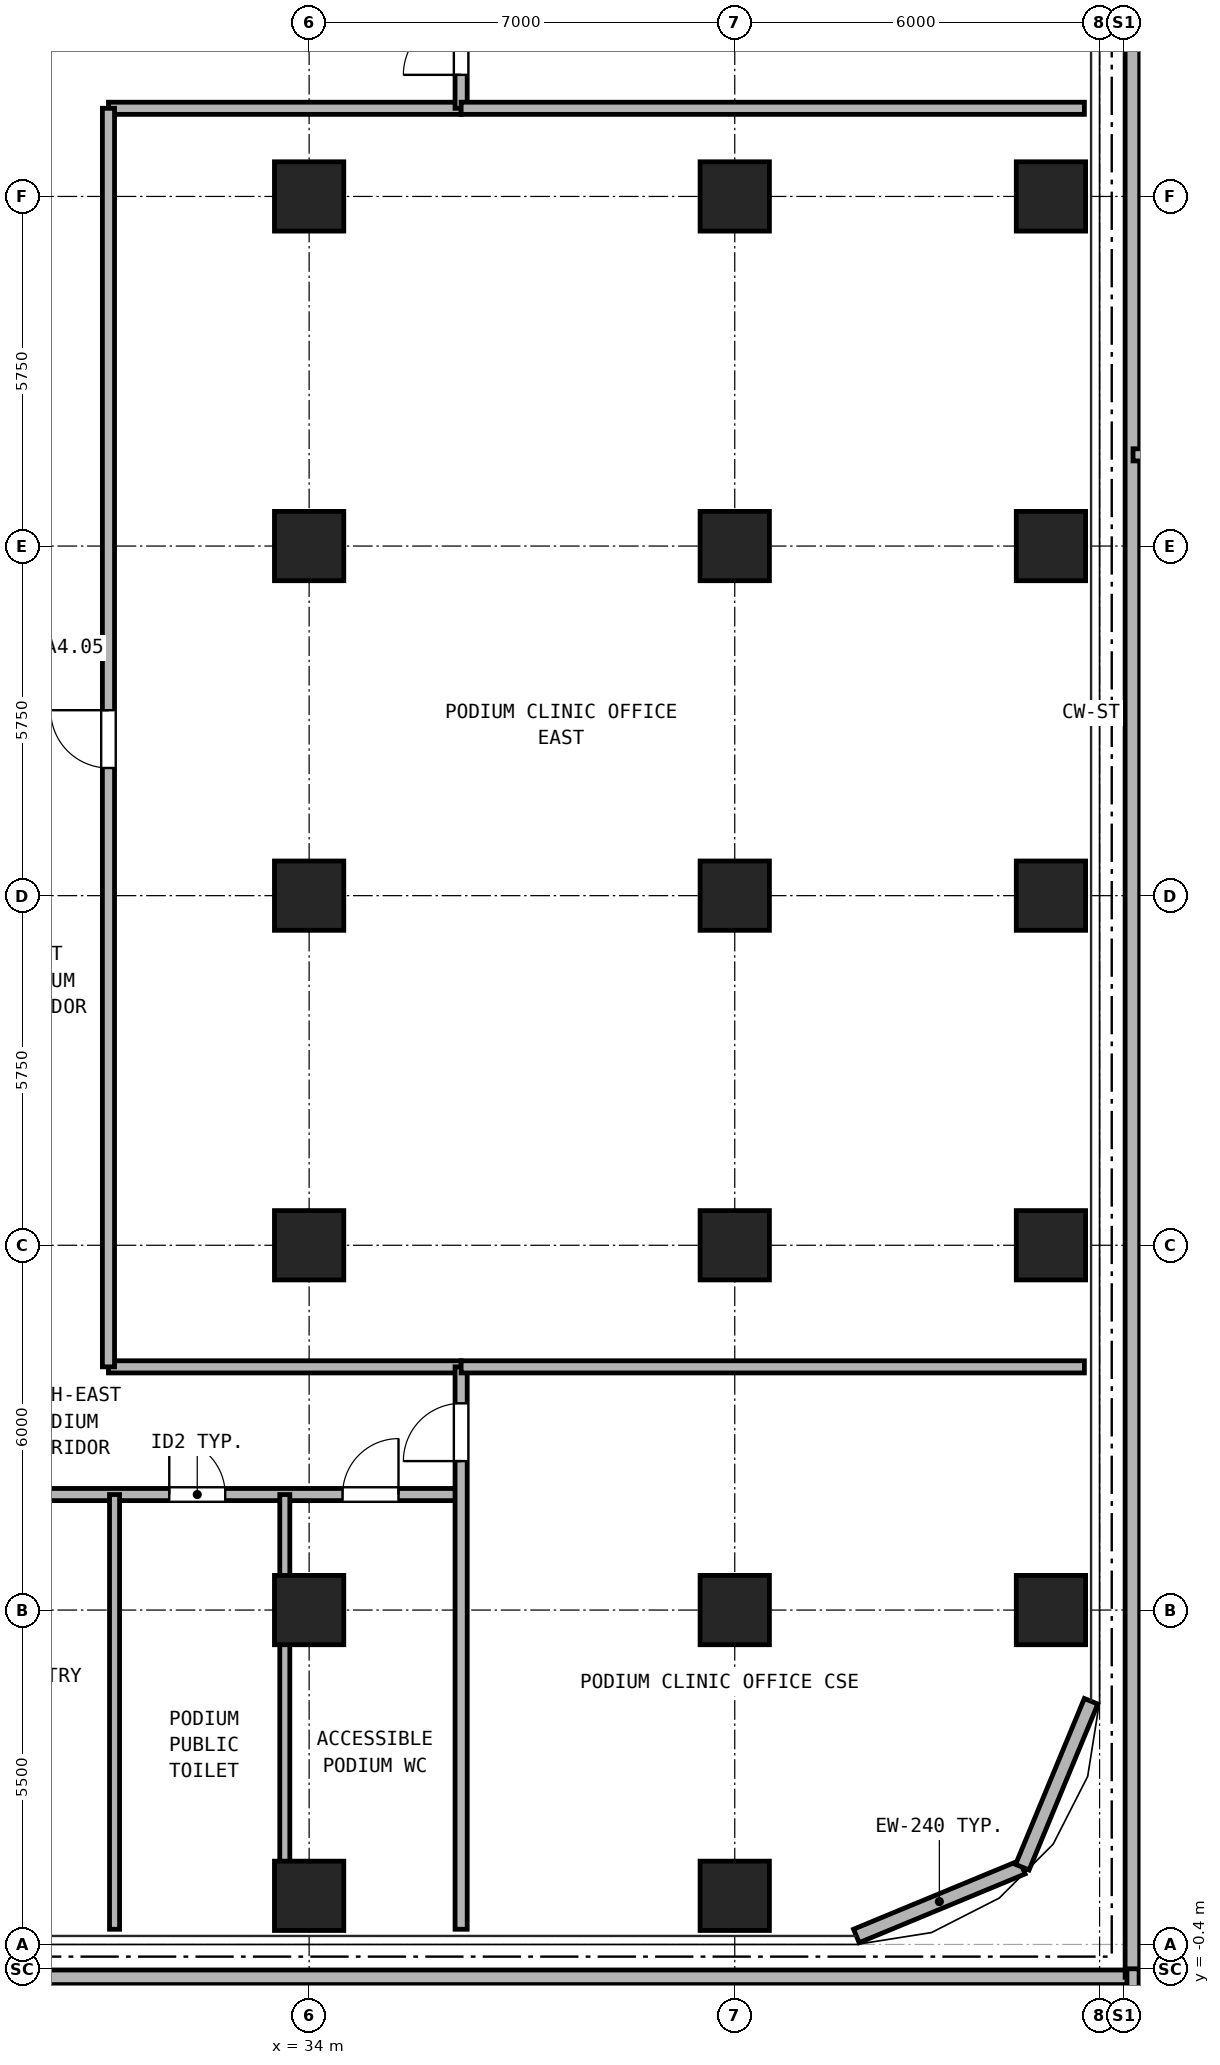
"""IFC4 building model, lengths in metres.
Left out: names, types, materials, properties, quantities, classifications, styles, units other than length and angle.
Written with IfcOpenShell. Run it as: python <this file> out.ifc"""

import sys

from ifc_helpers import new_model, si_unit, direction, frame, frame_2d, origin, origin_2d, place, context, subcontext, project, spatial, rectangle, hollow_rectangle, extrude, source, transform, mapped, element, fill, save


model = new_model("IFC4")
c1 = context("Model", 3, precision=1e-05, world=origin(), true_north=direction((0.0, 1.0)))
c2 = subcontext(c1, "Body", "Model", "MODEL_VIEW")
j1 = project(units=[si_unit("LENGTHUNIT", "METRE"), si_unit("PLANEANGLEUNIT", "RADIAN")], contexts=[c1])
p1 = place(None, origin())
s1 = spatial("IfcSite", under=j1, at=p1, CompositionType="ELEMENT")
p2 = place(p1, origin())
s2 = spatial("IfcBuilding", under=s1, at=p2, CompositionType="ELEMENT")
p3 = place(p2, frame((0.0, 0.0, 18.0)))
s3 = spatial("IfcBuildingStorey", under=s2, at=p3, CompositionType="ELEMENT", Elevation=18.0)
m1 = source(origin(), c2, "Body", "SweptSolid", [
    extrude(hollow_rectangle(XDim=1.14, YDim=1.14, WallThickness=0.07, at=origin_2d()), origin(), (0.0, 0.0, 1.0), 4.14),
])
for number, where, z_axis, x_axis in (
    (1, (34.0, 0.8, 0.0), (0.0, 0.0, 1.0), (1.0, 0.0, 0.0)),
    (2, (41.0, 0.8, 0.0), (0.0, 0.0, 1.0), (1.0, 0.0, 0.0)),
    (3, (46.2, 5.5, 0.0), (0.0, 0.0, 1.0), (1.0, 0.0, 0.0)),
    (4, (46.2, 11.5, 0.0), (0.0, 0.0, 1.0), (1.0, 0.0, 0.0)),
    (5, (46.2, 17.25, 0.0), (0.0, 0.0, 1.0), (1.0, 0.0, 0.0)),
    (6, (46.2, 23.0, 0.0), (0.0, 0.0, 1.0), (1.0, 0.0, 0.0)),
    (7, (46.2, 28.75, 0.0), (0.0, 0.0, 1.0), (1.0, 0.0, 0.0)),
    (8, (34.0, 5.5, 0.0), (0.0, 0.0, 1.0), (1.0, 0.0, 0.0)),
    (9, (34.0, 11.5, 0.0), (0.0, 0.0, 1.0), (1.0, 0.0, 0.0)),
    (10, (34.0, 17.25, 0.0), (0.0, 0.0, 1.0), (1.0, 0.0, 0.0)),
    (11, (34.0, 23.0, 0.0), (0.0, 0.0, 1.0), (1.0, 0.0, 0.0)),
    (12, (34.0, 28.75, 0.0), (0.0, 0.0, 1.0), (1.0, 0.0, 0.0)),
    (13, (41.0, 5.5, 0.0), (0.0, 0.0, 1.0), (1.0, 0.0, 0.0)),
    (14, (41.0, 11.5, 0.0), (0.0, 0.0, 1.0), (1.0, 0.0, 0.0)),
    (15, (41.0, 17.25, 0.0), (0.0, 0.0, 1.0), (1.0, 0.0, 0.0)),
    (16, (41.0, 23.0, 0.0), (0.0, 0.0, 1.0), (1.0, 0.0, 0.0)),
    (17, (41.0, 28.75, 0.0), (0.0, 0.0, 1.0), (1.0, 0.0, 0.0)),
):
    element("IfcColumn", number, at=place(p3, frame(where, z_axis=z_axis, x_axis=x_axis)), inside=s3, PredefinedType="COLUMN", context=c2, shape_type="MappedRepresentation", body=[
        mapped(m1, transform((0.0, 0.0, 0.0), x_axis=(1.0, 0.0, 0.0), y_axis=(0.0, 1.0, 0.0), z_axis=(0.0, 0.0, 1.0), scale=1.0)),
    ])
for number, where, z_axis, x_axis in (
    (18, (43.0, 0.14, 0.0), (0.0, 0.0, 1.0), (0.924, 0.383, 0.0)),
    (19, (45.729, 1.271, 0.0), (0.0, 0.0, 1.0), (0.383, 0.924, 0.0)),
):
    element("IfcWall", number, at=place(p3, frame(where, z_axis=z_axis, x_axis=x_axis)), inside=s3, PredefinedType="SOLIDWALL", context=c2, shape_type="SweptSolid", body=[
        extrude(rectangle(XDim=2.954, YDim=0.24, at=frame_2d((1.477, 0.0))), origin(), (0.0, 0.0, 1.0), 4.14),
    ])
p4 = place(p3, frame((0.2, -0.54, 0.0), z_axis=(0.0, 0.0, 1.0), x_axis=(1.0, 0.0, 0.0)))
e20 = element("IfcWall", 20, at=p4, inside=s3, PredefinedType="SOLIDWALL", context=c2, shape_type="SweptSolid", body=[
    extrude(rectangle(XDim=47.34, YDim=0.24, at=frame_2d((23.67, 0.0))), origin(), (0.0, 0.0, 1.0), 4.2),
])
p5 = place(p3, frame((47.54, -0.54, 0.0), z_axis=(0.0, 0.0, 1.0), x_axis=(0.0, 1.0, 0.0)))
e21 = element("IfcWall", 21, at=p5, inside=s3, PredefinedType="SOLIDWALL", context=c2, shape_type="SweptSolid", body=[
    extrude(rectangle(XDim=40.89, YDim=0.24, at=frame_2d((20.445, 0.0))), origin(), (0.0, 0.0, 1.0), 4.2),
])
p6 = place(p3, frame((10.5, 7.4, 0.0), z_axis=(0.0, 0.0, 1.0), x_axis=(1.0, 0.0, 0.0)))
e22 = element("IfcWall", 22, at=p6, inside=s3, PredefinedType="PARTITIONING", context=c2, shape_type="SweptSolid", body=[
    extrude(rectangle(XDim=26.0, YDim=0.2, at=frame_2d((13.0, 0.0))), origin(), (0.0, 0.0, 1.0), 4.14),
])
p7 = place(p6, frame((3.5, 0.0, 0.0)))
e23 = element("IfcOpeningElement", 23, at=p7, cuts=e22, PredefinedType="OPENING", context=c2, shape_type="SweptSolid", body=[
    extrude(rectangle(XDim=0.95, YDim=2.15, at=frame_2d((0.475, 1.075))), frame((0.0, 0.11, 0.0), z_axis=(0.0, -1.0, 0.0), x_axis=(1.0, 0.0, 0.0)), (0.0, 0.0, 1.0), 0.22),
])
p8 = place(p6, frame((11.0, 0.0, 0.0)))
e24 = element("IfcOpeningElement", 24, at=p8, cuts=e22, PredefinedType="OPENING", context=c2, shape_type="SweptSolid", body=[
    extrude(rectangle(XDim=0.95, YDim=2.15, at=frame_2d((0.475, 1.075))), frame((0.0, 0.11, 0.0), z_axis=(0.0, -1.0, 0.0), x_axis=(1.0, 0.0, 0.0)), (0.0, 0.0, 1.0), 0.22),
])
p9 = place(p6, frame((17.15, 0.0, 0.0)))
e25 = element("IfcOpeningElement", 25, at=p9, cuts=e22, PredefinedType="OPENING", context=c2, shape_type="SweptSolid", body=[
    extrude(rectangle(XDim=0.95, YDim=2.15, at=frame_2d((0.475, 1.075))), frame((0.0, 0.11, 0.0), z_axis=(0.0, -1.0, 0.0), x_axis=(1.0, 0.0, 0.0)), (0.0, 0.0, 1.0), 0.22),
])
p10 = place(p6, frame((21.2, 0.0, 0.0)))
e26 = element("IfcOpeningElement", 26, at=p10, cuts=e22, PredefinedType="OPENING", context=c2, shape_type="SweptSolid", body=[
    extrude(rectangle(XDim=0.92, YDim=2.1, at=frame_2d((0.46, 1.05))), frame((0.0, 0.11, 0.0), z_axis=(0.0, -1.0, 0.0), x_axis=(1.0, 0.0, 0.0)), (0.0, 0.0, 1.0), 0.22),
])
p11 = place(p6, frame((24.05, 0.0, 0.0)))
e27 = element("IfcOpeningElement", 27, at=p11, cuts=e22, PredefinedType="OPENING", context=c2, shape_type="SweptSolid", body=[
    extrude(rectangle(XDim=0.92, YDim=2.1, at=frame_2d((0.46, 1.05))), frame((0.0, 0.11, 0.0), z_axis=(0.0, -1.0, 0.0), x_axis=(1.0, 0.0, 0.0)), (0.0, 0.0, 1.0), 0.22),
])
for number, where, z_axis, x_axis in (
    (28, (30.7, 9.5, 0.0), (0.0, 0.0, 1.0), (1.0, 0.0, 0.0)),
    (29, (30.7, 30.2, 0.0), (0.0, 0.0, 1.0), (1.0, 0.0, 0.0)),
):
    element("IfcWall", number, at=place(p3, frame(where, z_axis=z_axis, x_axis=x_axis)), inside=s3, PredefinedType="PARTITIONING", context=c2, shape_type="SweptSolid", body=[
        extrude(rectangle(XDim=5.8, YDim=0.2, at=frame_2d((2.9, 0.0))), origin(), (0.0, 0.0, 1.0), 4.14),
    ])
p12 = place(p3, frame((30.7, 9.5, 0.0), z_axis=(0.0, 0.0, 1.0), x_axis=(0.0, 1.0, 0.0)))
e30 = element("IfcWall", 30, at=p12, inside=s3, PredefinedType="PARTITIONING", context=c2, shape_type="SweptSolid", body=[
    extrude(rectangle(XDim=20.7, YDim=0.2, at=frame_2d((10.35, 0.0))), origin(), (0.0, 0.0, 1.0), 4.14),
])
p13 = place(p12, frame((9.85, 0.0, 0.0)))
e31 = element("IfcOpeningElement", 31, at=p13, cuts=e30, PredefinedType="OPENING", context=c2, shape_type="SweptSolid", body=[
    extrude(rectangle(XDim=0.95, YDim=2.15, at=frame_2d((0.475, 1.075))), frame((0.0, 0.11, 0.0), z_axis=(0.0, -1.0, 0.0), x_axis=(1.0, 0.0, 0.0)), (0.0, 0.0, 1.0), 0.22),
])
p14 = place(p3, frame((36.5, 0.25, 0.0), z_axis=(0.0, 0.0, 1.0), x_axis=(0.0, 1.0, 0.0)))
e32 = element("IfcWall", 32, at=p14, inside=s3, PredefinedType="PARTITIONING", context=c2, shape_type="SweptSolid", body=[
    extrude(rectangle(XDim=9.25, YDim=0.2, at=frame_2d((4.625, 0.0))), origin(), (0.0, 0.0, 1.0), 4.14),
])
p15 = place(p14, frame((7.7, 0.0, 0.0)))
e33 = element("IfcOpeningElement", 33, at=p15, cuts=e32, PredefinedType="OPENING", context=c2, shape_type="SweptSolid", body=[
    extrude(rectangle(XDim=0.95, YDim=2.15, at=frame_2d((0.475, 1.075))), frame((0.0, 0.11, 0.0), z_axis=(0.0, -1.0, 0.0), x_axis=(1.0, 0.0, 0.0)), (0.0, 0.0, 1.0), 0.22),
])
p16 = place(p3, frame((36.5, 30.2, 0.0), z_axis=(0.0, 0.0, 1.0), x_axis=(0.0, 1.0, 0.0)))
e34 = element("IfcWall", 34, at=p16, inside=s3, PredefinedType="PARTITIONING", context=c2, shape_type="SweptSolid", body=[
    extrude(rectangle(XDim=10.05, YDim=0.2, at=frame_2d((5.025, 0.0))), origin(), (0.0, 0.0, 1.0), 4.14),
])
p17 = place(p16, frame((0.55, 0.0, 0.0)))
e35 = element("IfcOpeningElement", 35, at=p17, cuts=e34, PredefinedType="OPENING", context=c2, shape_type="SweptSolid", body=[
    extrude(rectangle(XDim=0.95, YDim=2.15, at=frame_2d((0.475, 1.075))), frame((0.0, 0.11, 0.0), z_axis=(0.0, -1.0, 0.0), x_axis=(1.0, 0.0, 0.0)), (0.0, 0.0, 1.0), 0.22),
])
for number, where, z_axis, x_axis in (
    (36, (36.5, 9.5, 0.0), (0.0, 0.0, 1.0), (1.0, 0.0, 0.0)),
    (37, (36.5, 30.2, 0.0), (0.0, 0.0, 1.0), (1.0, 0.0, 0.0)),
):
    element("IfcWall", number, at=place(p3, frame(where, z_axis=z_axis, x_axis=x_axis)), inside=s3, PredefinedType="PARTITIONING", context=c2, shape_type="SweptSolid", body=[
        extrude(rectangle(XDim=10.25, YDim=0.2, at=frame_2d((5.125, 0.0))), origin(), (0.0, 0.0, 1.0), 4.14),
    ])
for number, where, z_axis, x_axis in (
    (38, (30.8, 0.25, 0.0), (0.0, 0.0, 1.0), (0.0, 1.0, 0.0)),
    (39, (33.6, 0.25, 0.0), (0.0, 0.0, 1.0), (0.0, 1.0, 0.0)),
):
    element("IfcWall", number, at=place(p3, frame(where, z_axis=z_axis, x_axis=x_axis)), inside=s3, PredefinedType="PARTITIONING", context=c2, shape_type="SweptSolid", body=[
        extrude(rectangle(XDim=7.15, YDim=0.165, at=frame_2d((3.575, 0.0))), origin(), (0.0, 0.0, 1.0), 4.14),
    ])
p18 = place(p3, frame((47.55, 24.5, 0.0), z_axis=(0.0, 0.0, 1.0), x_axis=(1.0, 0.0, 0.0)))
e40 = element("IfcWall", 40, at=p18, inside=s3, PredefinedType="PARTITIONING", context=c2, shape_type="SweptSolid", body=[
    extrude(rectangle(XDim=23.9, YDim=0.2, at=frame_2d((11.95, 0.0))), origin(), (0.0, 0.0, 1.0), 4.14),
])
p19 = place(p18, frame((3.45, 0.0, 0.0)))
e41 = element("IfcOpeningElement", 41, at=p19, cuts=e40, PredefinedType="OPENING", context=c2, shape_type="SweptSolid", body=[
    extrude(rectangle(XDim=1.3, YDim=2.2, at=frame_2d((0.65, 1.1))), frame((0.0, 0.11, 0.0), z_axis=(0.0, -1.0, 0.0), x_axis=(1.0, 0.0, 0.0)), (0.0, 0.0, 1.0), 0.22),
])
p20 = place(p3, frame((47.55, -10.95, 0.0), z_axis=(0.0, 0.0, 1.0), x_axis=(0.0, 1.0, 0.0)))
e42 = element("IfcWall", 42, at=p20, inside=s3, PredefinedType="PARTITIONING", context=c2, shape_type="SweptSolid", body=[
    extrude(rectangle(XDim=10.55, YDim=0.2, at=frame_2d((5.275, 0.0))), origin(), (0.0, 0.0, 1.0), 4.14),
])
p21 = place(p20, frame((5.35, 0.0, 0.0)))
e43 = element("IfcOpeningElement", 43, at=p21, cuts=e42, PredefinedType="OPENING", context=c2, shape_type="SweptSolid", body=[
    extrude(rectangle(XDim=1.3, YDim=2.2, at=frame_2d((0.65, 1.1))), frame((0.0, 0.11, 0.0), z_axis=(0.0, -1.0, 0.0), x_axis=(1.0, 0.0, 0.0)), (0.0, 0.0, 1.0), 0.22),
])
p22 = place(p10, frame((0.92, 0.0, 0.0), z_axis=(0.0, 0.0, 1.0), x_axis=(-1.0, 0.0, 0.0)))
e44 = element("IfcDoor", 44, at=p22, inside=s3, OperationType="SINGLE_SWING_LEFT", PredefinedType="DOOR", context=c2, shape_type="SweptSolid", body=[
    extrude(rectangle(XDim=0.92, YDim=2.1, at=frame_2d((0.46, 1.05))), frame((0.0, 0.025, 0.0), z_axis=(0.0, -1.0, 0.0), x_axis=(1.0, 0.0, 0.0)), (0.0, 0.0, 1.0), 0.05),
])
fill(e26, e44)
p23 = place(p11, frame((0.92, 0.0, 0.0), z_axis=(0.0, 0.0, 1.0), x_axis=(-1.0, 0.0, 0.0)))
e45 = element("IfcDoor", 45, at=p23, inside=s3, OperationType="SINGLE_SWING_RIGHT", PredefinedType="DOOR", context=c2, shape_type="SweptSolid", body=[
    extrude(rectangle(XDim=0.92, YDim=2.1, at=frame_2d((0.46, 1.05))), frame((0.0, 0.025, 0.0), z_axis=(0.0, -1.0, 0.0), x_axis=(1.0, 0.0, 0.0)), (0.0, 0.0, 1.0), 0.05),
])
fill(e27, e45)
p24 = place(p15, origin())
e46 = element("IfcDoor", 46, at=p24, inside=s3, OperationType="SINGLE_SWING_LEFT", PredefinedType="DOOR", context=c2, shape_type="SweptSolid", body=[
    extrude(rectangle(XDim=0.95, YDim=2.15, at=frame_2d((0.475, 1.075))), frame((0.0, 0.025, 0.0), z_axis=(0.0, -1.0, 0.0), x_axis=(1.0, 0.0, 0.0)), (0.0, 0.0, 1.0), 0.05),
])
fill(e33, e46)
p25 = place(p17, origin())
e47 = element("IfcDoor", 47, at=p25, inside=s3, OperationType="SINGLE_SWING_LEFT", PredefinedType="DOOR", context=c2, shape_type="SweptSolid", body=[
    extrude(rectangle(XDim=0.95, YDim=2.15, at=frame_2d((0.475, 1.075))), frame((0.0, 0.025, 0.0), z_axis=(0.0, -1.0, 0.0), x_axis=(1.0, 0.0, 0.0)), (0.0, 0.0, 1.0), 0.05),
])
fill(e35, e47)
p26 = place(p13, origin())
e48 = element("IfcDoor", 48, at=p26, inside=s3, OperationType="SINGLE_SWING_RIGHT", PredefinedType="DOOR", context=c2, shape_type="SweptSolid", body=[
    extrude(rectangle(XDim=0.95, YDim=2.15, at=frame_2d((0.475, 1.075))), frame((0.0, 0.025, 0.0), z_axis=(0.0, -1.0, 0.0), x_axis=(1.0, 0.0, 0.0)), (0.0, 0.0, 1.0), 0.05),
])
fill(e31, e48)
save(model, sys.argv[1])
